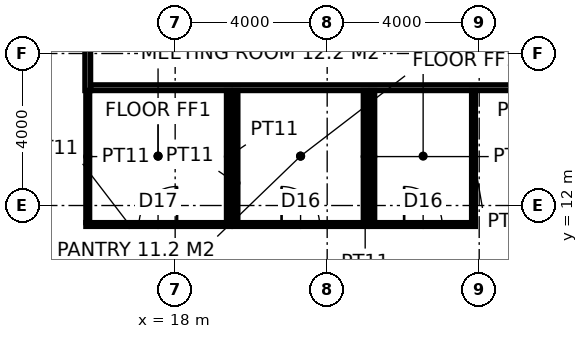
"""IFC4 building model, lengths in metres.
Left out: names, types, materials, properties, quantities, classifications, styles, units other than length and angle.
Written with IfcOpenShell. Run it as: python <this file> out.ifc"""

import sys

from ifc_helpers import new_model, si_unit, direction, frame, frame_2d, origin, place, context, subcontext, project, spatial, rectangle, extrude, element, fill, save


model = new_model("IFC4")
c1 = context("Model", 3, precision=1e-05, world=origin(), true_north=direction((0.0, 1.0)))
c2 = subcontext(c1, "Body", "Model", "MODEL_VIEW")
j1 = project(units=[si_unit("LENGTHUNIT", "METRE"), si_unit("PLANEANGLEUNIT", "RADIAN")], contexts=[c1])
p1 = place(None, origin())
s1 = spatial("IfcSite", under=j1, at=p1, CompositionType="ELEMENT")
p2 = place(p1, origin())
s2 = spatial("IfcBuilding", under=s1, at=p2, CompositionType="ELEMENT")
p3 = place(p2, frame((0.0, 0.0, 286.2)))
s3 = spatial("IfcBuildingStorey", under=s2, at=p3, CompositionType="ELEMENT", Elevation=286.2)
p4 = place(p3, frame((15.7, 15.025, 0.0), z_axis=(0.0, 0.0, 1.0), x_axis=(0.0, 1.0, 0.0)))
e1 = element("IfcWall", 1, at=p4, inside=s3, PredefinedType="PARTITIONING", context=c2, shape_type="SweptSolid", body=[
    extrude(rectangle(XDim=23.35, YDim=0.15, at=frame_2d((11.675, 0.0))), origin(), (0.0, 0.0, 1.0), 3.85),
])
p5 = place(p4, frame((3.275, 0.0, 0.0)))
e2 = element("IfcOpeningElement", 2, at=p5, cuts=e1, PredefinedType="OPENING", context=c2, shape_type="SweptSolid", body=[
    extrude(rectangle(XDim=1.8, YDim=2.4, at=frame_2d((0.9, 1.2))), frame((0.0, 0.085, 0.0), z_axis=(0.0, -1.0, 0.0), x_axis=(1.0, 0.0, 0.0)), (0.0, 0.0, 1.0), 0.17),
])
p6 = place(p4, frame((14.825, 0.0, 0.0)))
e3 = element("IfcOpeningElement", 3, at=p6, cuts=e1, PredefinedType="OPENING", context=c2, shape_type="SweptSolid", body=[
    extrude(rectangle(XDim=1.8, YDim=2.4, at=frame_2d((0.9, 1.2))), frame((0.0, 0.085, 0.0), z_axis=(0.0, -1.0, 0.0), x_axis=(1.0, 0.0, 0.0)), (0.0, 0.0, 1.0), 0.17),
])
p7 = place(p3, frame((15.775, 15.1, 0.0), z_axis=(0.0, 0.0, 1.0), x_axis=(1.0, 0.0, 0.0)))
e4 = element("IfcWall", 4, at=p7, inside=s3, PredefinedType="PARTITIONING", context=c2, shape_type="SweptSolid", body=[
    extrude(rectangle(XDim=22.65, YDim=0.15, at=frame_2d((11.325, 0.0))), origin(), (0.0, 0.0, 1.0), 3.85),
])
p8 = place(p3, frame((15.65, 11.5, 0.0), z_axis=(0.0, 0.0, 1.0), x_axis=(1.0, 0.0, 0.0)))
e5 = element("IfcWall", 5, at=p8, inside=s3, PredefinedType="PARTITIONING", context=c2, shape_type="SweptSolid", body=[
    extrude(rectangle(XDim=3.8, YDim=0.1, at=frame_2d((1.9, 0.0))), origin(), (0.0, 0.0, 1.0), 3.85),
])
p9 = place(p8, frame((1.4, 0.0, 0.0)))
e6 = element("IfcOpeningElement", 6, at=p9, cuts=e5, PredefinedType="OPENING", context=c2, shape_type="SweptSolid", body=[
    extrude(rectangle(XDim=1.0, YDim=2.2, at=frame_2d((0.5, 1.1))), frame((0.0, 0.06, 0.0), z_axis=(0.0, -1.0, 0.0), x_axis=(1.0, 0.0, 0.0)), (0.0, 0.0, 1.0), 0.12),
])
p10 = place(p3, frame((19.55, 11.5, 0.0), z_axis=(0.0, 0.0, 1.0), x_axis=(1.0, 0.0, 0.0)))
e7 = element("IfcWall", 7, at=p10, inside=s3, PredefinedType="PARTITIONING", context=c2, shape_type="SweptSolid", body=[
    extrude(rectangle(XDim=3.5, YDim=0.1, at=frame_2d((1.75, 0.0))), origin(), (0.0, 0.0, 1.0), 3.85),
])
p11 = place(p10, frame((1.25, 0.0, 0.0)))
e8 = element("IfcOpeningElement", 8, at=p11, cuts=e7, PredefinedType="OPENING", context=c2, shape_type="SweptSolid", body=[
    extrude(rectangle(XDim=1.0, YDim=2.2, at=frame_2d((0.5, 1.1))), frame((0.0, 0.06, 0.0), z_axis=(0.0, -1.0, 0.0), x_axis=(1.0, 0.0, 0.0)), (0.0, 0.0, 1.0), 0.12),
])
p12 = place(p3, frame((23.15, 11.5, 0.0), z_axis=(0.0, 0.0, 1.0), x_axis=(1.0, 0.0, 0.0)))
e9 = element("IfcWall", 9, at=p12, inside=s3, PredefinedType="PARTITIONING", context=c2, shape_type="SweptSolid", body=[
    extrude(rectangle(XDim=2.75, YDim=0.1, at=frame_2d((1.375, 0.0))), origin(), (0.0, 0.0, 1.0), 3.85),
])
p13 = place(p12, frame((0.875, 0.0, 0.0)))
e10 = element("IfcOpeningElement", 10, at=p13, cuts=e9, PredefinedType="OPENING", context=c2, shape_type="SweptSolid", body=[
    extrude(rectangle(XDim=1.0, YDim=2.2, at=frame_2d((0.5, 1.1))), frame((0.0, 0.06, 0.0), z_axis=(0.0, -1.0, 0.0), x_axis=(1.0, 0.0, 0.0)), (0.0, 0.0, 1.0), 0.12),
])
for number, where, z_axis, x_axis in (
    (11, (15.7, 11.55, 0.0), (0.0, 0.0, 1.0), (0.0, 1.0, 0.0)),
    (12, (19.4, 11.55, 0.0), (0.0, 0.0, 1.0), (0.0, 1.0, 0.0)),
    (13, (19.6, 11.55, 0.0), (0.0, 0.0, 1.0), (0.0, 1.0, 0.0)),
    (14, (23.0, 11.55, 0.0), (0.0, 0.0, 1.0), (0.0, 1.0, 0.0)),
    (15, (23.2, 11.55, 0.0), (0.0, 0.0, 1.0), (0.0, 1.0, 0.0)),
):
    element("IfcWall", number, at=place(p3, frame(where, z_axis=z_axis, x_axis=x_axis)), inside=s3, PredefinedType="PARTITIONING", context=c2, shape_type="SweptSolid", body=[
        extrude(rectangle(XDim=3.475, YDim=0.1, at=frame_2d((1.737, 0.0))), origin(), (0.0, 0.0, 1.0), 3.85),
    ])
p14 = place(p3, frame((25.85, 11.55, 0.0), z_axis=(0.0, 0.0, 1.0), x_axis=(0.0, 1.0, 0.0)))
e16 = element("IfcWall", 16, at=p14, inside=s3, PredefinedType="PARTITIONING", context=c2, shape_type="SweptSolid", body=[
    extrude(rectangle(XDim=3.475, YDim=0.1, at=frame_2d((1.737, 0.0))), origin(), (0.0, 0.0, 1.0), 2.95),
])
p15 = place(p9, origin())
e17 = element("IfcDoor", 17, at=p15, inside=s3, OperationType="SINGLE_SWING_RIGHT", PredefinedType="DOOR", context=c2, shape_type="SweptSolid", body=[
    extrude(rectangle(XDim=1.0, YDim=2.2, at=frame_2d((0.5, 1.1))), frame((0.0, 0.025, 0.0), z_axis=(0.0, -1.0, 0.0), x_axis=(1.0, 0.0, 0.0)), (0.0, 0.0, 1.0), 0.05),
])
fill(e6, e17)
p16 = place(p11, origin())
e18 = element("IfcDoor", 18, at=p16, inside=s3, OperationType="SINGLE_SWING_LEFT", PredefinedType="DOOR", context=c2, shape_type="SweptSolid", body=[
    extrude(rectangle(XDim=1.0, YDim=2.2, at=frame_2d((0.5, 1.1))), frame((0.0, 0.025, 0.0), z_axis=(0.0, -1.0, 0.0), x_axis=(1.0, 0.0, 0.0)), (0.0, 0.0, 1.0), 0.05),
])
fill(e8, e18)
p17 = place(p13, origin())
e19 = element("IfcDoor", 19, at=p17, inside=s3, OperationType="SINGLE_SWING_LEFT", PredefinedType="DOOR", context=c2, shape_type="SweptSolid", body=[
    extrude(rectangle(XDim=1.0, YDim=2.2, at=frame_2d((0.5, 1.1))), frame((0.0, 0.025, 0.0), z_axis=(0.0, -1.0, 0.0), x_axis=(1.0, 0.0, 0.0)), (0.0, 0.0, 1.0), 0.05),
])
fill(e10, e19)
save(model, sys.argv[1])
